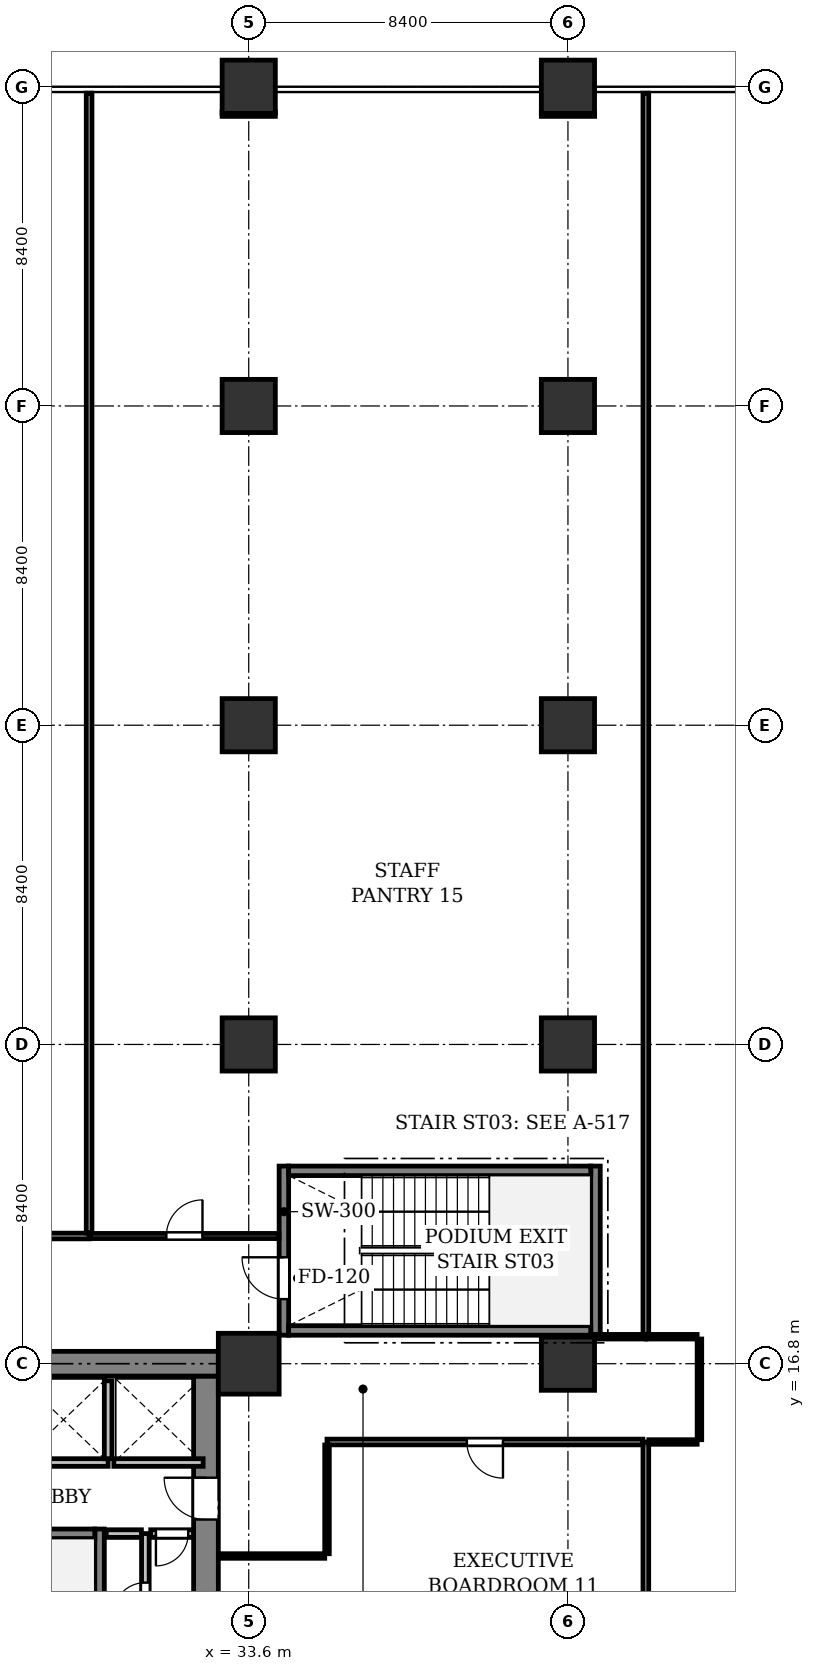
"""IFC4 building model, lengths in metres.
Left out: names, types, materials, properties, quantities, classifications, styles, units other than length and angle.
Written with IfcOpenShell. Run it as: python <this file> out.ifc"""

import sys

from ifc_helpers import new_model, si_unit, direction, frame, frame_2d, origin, origin_2d, place, context, subcontext, project, spatial, rectangle, extrude, element, fill, save


model = new_model("IFC4")
c1 = context("Model", 3, precision=1e-05, world=origin(), true_north=direction((0.0, 1.0)))
c2 = subcontext(c1, "Body", "Model", "MODEL_VIEW")
j1 = project(units=[si_unit("LENGTHUNIT", "METRE"), si_unit("PLANEANGLEUNIT", "RADIAN")], contexts=[c1])
p1 = place(None, origin())
s1 = spatial("IfcSite", under=j1, at=p1, CompositionType="ELEMENT")
p2 = place(p1, origin())
s2 = spatial("IfcBuilding", under=s1, at=p2, CompositionType="ELEMENT")
p3 = place(p2, frame((0.0, 0.0, 10.2)))
s3 = spatial("IfcBuildingStorey", under=s2, at=p3, CompositionType="ELEMENT", Elevation=10.2)
p4 = place(p3, frame((33.6, 16.8, 0.0), z_axis=(0.0, 0.0, 1.0), x_axis=(1.0, 0.0, 0.0)))
e1 = element("IfcColumn", 1, at=p4, inside=s3, PredefinedType="COLUMN", context=c2, shape_type="SweptSolid", body=[
    extrude(rectangle(XDim=1.6, YDim=1.6, at=origin_2d()), origin(), (0.0, 0.0, 1.0), 4.8),
])
for number, where, z_axis, x_axis in (
    (2, (33.6, 25.2, 0.0), (0.0, 0.0, 1.0), (1.0, 0.0, 0.0)),
    (3, (33.6, 33.6, 0.0), (0.0, 0.0, 1.0), (1.0, 0.0, 0.0)),
    (4, (33.6, 42.0, 0.0), (0.0, 0.0, 1.0), (1.0, 0.0, 0.0)),
    (5, (33.6, 50.4, 0.0), (0.0, 0.0, 1.0), (1.0, 0.0, 0.0)),
    (6, (42.0, 16.8, 0.0), (0.0, 0.0, 1.0), (1.0, 0.0, 0.0)),
    (7, (42.0, 25.2, 0.0), (0.0, 0.0, 1.0), (1.0, 0.0, 0.0)),
    (8, (42.0, 33.6, 0.0), (0.0, 0.0, 1.0), (1.0, 0.0, 0.0)),
    (9, (42.0, 42.0, 0.0), (0.0, 0.0, 1.0), (1.0, 0.0, 0.0)),
    (10, (42.0, 50.4, 0.0), (0.0, 0.0, 1.0), (1.0, 0.0, 0.0)),
):
    element("IfcColumn", number, at=place(p3, frame(where, z_axis=z_axis, x_axis=x_axis)), inside=s3, PredefinedType="COLUMN", context=c2, shape_type="SweptSolid", body=[
        extrude(rectangle(XDim=1.4, YDim=1.4, at=origin_2d()), origin(), (0.0, 0.0, 1.0), 4.8),
    ])
p5 = place(p3, frame((32.475, 8.725, 0.0), z_axis=(0.0, 0.0, 1.0), x_axis=(0.0, 1.0, 0.0)))
e11 = element("IfcWall", 11, at=p5, inside=s3, PredefinedType="SHEAR", context=c2, shape_type="SweptSolid", body=[
    extrude(rectangle(XDim=7.75, YDim=0.65, at=frame_2d((3.875, 0.0))), origin(), (0.0, 0.0, 1.0), 4.525),
])
p6 = place(p5, frame((3.975, 0.0, 0.0)))
e12 = element("IfcOpeningElement", 12, at=p6, cuts=e11, PredefinedType="OPENING", context=c2, shape_type="SweptSolid", body=[
    extrude(rectangle(XDim=1.1, YDim=2.15, at=frame_2d((0.55, 1.075))), frame((0.0, 0.335, 0.0), z_axis=(0.0, -1.0, 0.0), x_axis=(1.0, 0.0, 0.0)), (0.0, 0.0, 1.0), 0.67),
])
p7 = place(p3, frame((26.0, 16.8, 0.0), z_axis=(0.0, 0.0, 1.0), x_axis=(1.0, 0.0, 0.0)))
e13 = element("IfcWall", 13, at=p7, inside=s3, PredefinedType="SHEAR", context=c2, shape_type="SweptSolid", body=[
    extrude(rectangle(XDim=6.8, YDim=0.65, at=frame_2d((3.4, 0.0))), origin(), (0.0, 0.0, 1.0), 4.525),
])
p8 = place(p3, frame((29.675, 8.7, 0.0), z_axis=(0.0, 0.0, 1.0), x_axis=(0.0, 1.0, 0.0)))
e14 = element("IfcWall", 14, at=p8, inside=s3, PredefinedType="SHEAR", context=c2, shape_type="SweptSolid", body=[
    extrude(rectangle(XDim=3.75, YDim=0.25, at=frame_2d((1.875, 0.0))), origin(), (0.0, 0.0, 1.0), 4.525),
])
p9 = place(p3, frame((21.8, 12.325, 0.0), z_axis=(0.0, 0.0, 1.0), x_axis=(1.0, 0.0, 0.0)))
e15 = element("IfcWall", 15, at=p9, inside=s3, PredefinedType="SHEAR", context=c2, shape_type="SweptSolid", body=[
    extrude(rectangle(XDim=7.75, YDim=0.25, at=frame_2d((3.875, 0.0))), origin(), (0.0, 0.0, 1.0), 4.525),
])
p10 = place(p9, frame((0.22, 0.0, 0.0)))
e16 = element("IfcOpeningElement", 16, at=p10, cuts=e15, PredefinedType="OPENING", context=c2, shape_type="SweptSolid", body=[
    extrude(rectangle(XDim=1.1, YDim=2.15, at=frame_2d((0.55, 1.075))), frame((0.0, 0.135, 0.0), z_axis=(0.0, -1.0, 0.0), x_axis=(1.0, 0.0, 0.0)), (0.0, 0.0, 1.0), 0.27),
])
p11 = place(p3, frame((34.525, 17.55, 0.0), z_axis=(0.0, 0.0, 1.0), x_axis=(0.0, 1.0, 0.0)))
e17 = element("IfcWall", 17, at=p11, inside=s3, PredefinedType="SHEAR", context=c2, shape_type="SweptSolid", body=[
    extrude(rectangle(XDim=4.45, YDim=0.25, at=frame_2d((2.225, 0.0))), origin(), (0.0, 0.0, 1.0), 4.525),
])
p12 = place(p11, frame((0.95, 0.0, 0.0)))
e18 = element("IfcOpeningElement", 18, at=p12, cuts=e17, PredefinedType="OPENING", context=c2, shape_type="SweptSolid", body=[
    extrude(rectangle(XDim=1.1, YDim=2.15, at=frame_2d((0.55, 1.075))), frame((0.0, 0.135, 0.0), z_axis=(0.0, -1.0, 0.0), x_axis=(1.0, 0.0, 0.0)), (0.0, 0.0, 1.0), 0.27),
])
p13 = place(p3, frame((42.725, 17.55, 0.0), z_axis=(0.0, 0.0, 1.0), x_axis=(0.0, 1.0, 0.0)))
e19 = element("IfcWall", 19, at=p13, inside=s3, PredefinedType="SHEAR", context=c2, shape_type="SweptSolid", body=[
    extrude(rectangle(XDim=4.45, YDim=0.25, at=frame_2d((2.225, 0.0))), origin(), (0.0, 0.0, 1.0), 4.525),
])
for number, where, z_axis, x_axis in (
    (20, (34.65, 17.675, 0.0), (0.0, 0.0, 1.0), (1.0, 0.0, 0.0)),
    (21, (34.65, 21.875, 0.0), (0.0, 0.0, 1.0), (1.0, 0.0, 0.0)),
):
    element("IfcWall", number, at=place(p3, frame(where, z_axis=z_axis, x_axis=x_axis)), inside=s3, PredefinedType="SHEAR", context=c2, shape_type="SweptSolid", body=[
        extrude(rectangle(XDim=7.95, YDim=0.25, at=frame_2d((3.975, 0.0))), origin(), (0.0, 0.0, 1.0), 4.525),
    ])
p14 = place(p3, frame((27.55, 14.2, 0.0), z_axis=(0.0, 0.0, 1.0), x_axis=(1.0, 0.0, 0.0)))
e22 = element("IfcWall", 22, at=p14, inside=s3, PredefinedType="PARTITIONING", context=c2, shape_type="SweptSolid", body=[
    extrude(rectangle(XDim=2.35, YDim=0.2, at=frame_2d((1.175, 0.0))), origin(), (0.0, 0.0, 1.0), 4.525),
])
p15 = place(p3, frame((29.9, 14.3, 0.0), z_axis=(0.0, 0.0, 1.0), x_axis=(0.0, 1.0, 0.0)))
e23 = element("IfcWall", 23, at=p15, inside=s3, PredefinedType="PARTITIONING", context=c2, shape_type="SweptSolid", body=[
    extrude(rectangle(XDim=2.05, YDim=0.2, at=frame_2d((1.025, 0.0))), origin(), (0.0, 0.0, 1.0), 4.525),
])
p16 = place(p3, frame((30.05, 14.2, 0.0), z_axis=(0.0, 0.0, 1.0), x_axis=(1.0, 0.0, 0.0)))
e24 = element("IfcWall", 24, at=p16, inside=s3, PredefinedType="PARTITIONING", context=c2, shape_type="SweptSolid", body=[
    extrude(rectangle(XDim=2.35, YDim=0.2, at=frame_2d((1.175, 0.0))), origin(), (0.0, 0.0, 1.0), 4.525),
])
p17 = place(p3, frame((30.88, 8.9, 0.0), z_axis=(0.0, 0.0, 1.0), x_axis=(0.0, 1.0, 0.0)))
e25 = element("IfcWall", 25, at=p17, inside=s3, PredefinedType="PARTITIONING", context=c2, shape_type="SweptSolid", body=[
    extrude(rectangle(XDim=3.43, YDim=0.2, at=frame_2d((1.715, 0.0))), origin(), (0.0, 0.0, 1.0), 4.525),
])
p18 = place(p17, frame((1.29, 0.0, 0.0)))
e26 = element("IfcOpeningElement", 26, at=p18, cuts=e25, PredefinedType="OPENING", context=c2, shape_type="SweptSolid", body=[
    extrude(rectangle(XDim=0.85, YDim=2.15, at=frame_2d((0.425, 1.075))), frame((0.0, 0.11, 0.0), z_axis=(0.0, -1.0, 0.0), x_axis=(1.0, 0.0, 0.0)), (0.0, 0.0, 1.0), 0.22),
])
p19 = place(p3, frame((30.776, 12.33, 0.0), z_axis=(0.0, 0.0, 1.0), x_axis=(-1.0, 0.0, 0.0)))
e27 = element("IfcWall", 27, at=p19, inside=s3, PredefinedType="PARTITIONING", context=c2, shape_type="SweptSolid", body=[
    extrude(rectangle(XDim=0.926, YDim=0.2, at=frame_2d((0.463, 0.0))), origin(), (0.0, 0.0, 1.0), 4.525),
])
p20 = place(p3, frame((32.146, 12.33, 0.0), z_axis=(0.0, 0.0, 1.0), x_axis=(-1.0, 0.0, 0.0)))
e28 = element("IfcWall", 28, at=p20, inside=s3, PredefinedType="PARTITIONING", context=c2, shape_type="SweptSolid", body=[
    extrude(rectangle(XDim=1.126, YDim=0.2, at=frame_2d((0.563, 0.0))), origin(), (0.0, 0.0, 1.0), 4.525),
])
p21 = place(p20, frame((0.138, 0.0, 0.0)))
e29 = element("IfcOpeningElement", 29, at=p21, cuts=e28, PredefinedType="OPENING", context=c2, shape_type="SweptSolid", body=[
    extrude(rectangle(XDim=0.85, YDim=2.15, at=frame_2d((0.425, 1.075))), frame((0.0, 0.11, 0.0), z_axis=(0.0, -1.0, 0.0), x_axis=(1.0, 0.0, 0.0)), (0.0, 0.0, 1.0), 0.22),
])
p22 = place(p3, frame((44.05, 7.824, 0.0), z_axis=(0.0, 0.0, 1.0), x_axis=(0.0, 1.0, 0.0)))
e30 = element("IfcWall", 30, at=p22, inside=s3, PredefinedType="PARTITIONING", context=c2, shape_type="SweptSolid", body=[
    extrude(rectangle(XDim=6.916, YDim=0.15, at=frame_2d((3.458, 0.0))), origin(), (0.0, 0.0, 1.0), 3.725),
])
p23 = place(p3, frame((43.971, 14.74, 0.0), z_axis=(0.0, 0.0, 1.0), x_axis=(-1.0, 0.0, 0.0)))
e31 = element("IfcWall", 31, at=p23, inside=s3, PredefinedType="PARTITIONING", context=c2, shape_type="SweptSolid", body=[
    extrude(rectangle(XDim=8.311, YDim=0.15, at=frame_2d((4.156, 0.0))), origin(), (0.0, 0.0, 1.0), 3.913),
])
p24 = place(p23, frame((3.68, 0.0, 0.0)))
e32 = element("IfcOpeningElement", 32, at=p24, cuts=e31, PredefinedType="OPENING", context=c2, shape_type="SweptSolid", body=[
    extrude(rectangle(XDim=0.95, YDim=2.15, at=frame_2d((0.475, 1.075))), frame((0.0, 0.085, 0.0), z_axis=(0.0, -1.0, 0.0), x_axis=(1.0, 0.0, 0.0)), (0.0, 0.0, 1.0), 0.17),
])
p25 = place(p3, frame((35.66, 14.661, 0.0), z_axis=(0.0, 0.0, 1.0), x_axis=(0.0, -1.0, 0.0)))
e33 = element("IfcWall", 33, at=p25, inside=s3, PredefinedType="PARTITIONING", context=c2, shape_type="SweptSolid", body=[
    extrude(rectangle(XDim=2.861, YDim=0.12, at=frame_2d((1.43, 0.0))), origin(), (0.0, 0.0, 1.0), 4.525),
])
p26 = place(p3, frame((35.6, 11.74, 0.0), z_axis=(0.0, 0.0, 1.0), x_axis=(-1.0, 0.0, 0.0)))
e34 = element("IfcWall", 34, at=p26, inside=s3, PredefinedType="PARTITIONING", context=c2, shape_type="SweptSolid", body=[
    extrude(rectangle(XDim=2.796, YDim=0.12, at=frame_2d((1.398, 0.0))), origin(), (0.0, 0.0, 1.0), 3.913),
])
p27 = place(p3, frame((20.039, 20.16, 0.0), z_axis=(0.0, 0.0, 1.0), x_axis=(1.0, 0.0, 0.0)))
e35 = element("IfcWall", 35, at=p27, inside=s3, PredefinedType="PARTITIONING", context=c2, shape_type="SweptSolid", body=[
    extrude(rectangle(XDim=9.361, YDim=0.15, at=frame_2d((4.68, 0.0))), origin(), (0.0, 0.0, 1.0), 3.913),
])
p28 = place(p3, frame((29.4, 20.239, 0.0), z_axis=(0.0, 0.0, 1.0), x_axis=(0.0, 1.0, 0.0)))
e36 = element("IfcWall", 36, at=p28, inside=s3, PredefinedType="PARTITIONING", context=c2, shape_type="SweptSolid", body=[
    extrude(rectangle(XDim=29.992, YDim=0.15, at=frame_2d((14.996, 0.0))), origin(), (0.0, 0.0, 1.0), 3.725),
])
p29 = place(p3, frame((42.717, 17.51, 0.0), z_axis=(0.0, 0.0, 1.0), x_axis=(1.0, 0.0, 0.0)))
e37 = element("IfcWall", 37, at=p29, inside=s3, PredefinedType="PARTITIONING", context=c2, shape_type="SweptSolid", body=[
    extrude(rectangle(XDim=1.333, YDim=0.12, at=frame_2d((0.667, 0.0))), origin(), (0.0, 0.0, 1.0), 4.525),
])
p30 = place(p3, frame((44.05, 17.574, 0.0), z_axis=(0.0, 0.0, 1.0), x_axis=(0.0, 1.0, 0.0)))
e38 = element("IfcWall", 38, at=p30, inside=s3, PredefinedType="PARTITIONING", context=c2, shape_type="SweptSolid", body=[
    extrude(rectangle(XDim=32.657, YDim=0.15, at=frame_2d((16.329, 0.0))), origin(), (0.0, 0.0, 1.0), 3.725),
])
p31 = place(p3, frame((42.702, 49.68, 0.0), z_axis=(0.0, 0.0, 1.0), x_axis=(-0.999999984835, -0.000174155344, 0.0)))
e39 = element("IfcWall", 39, at=p31, inside=s3, PredefinedType="PARTITIONING", context=c2, shape_type="SweptSolid", body=[
    extrude(rectangle(XDim=1.402, YDim=0.12, at=frame_2d((0.701, 0.0))), origin(), (0.0, 0.0, 1.0), 3.913),
])
p32 = place(p3, frame((34.3, 49.68, 0.0), z_axis=(0.0, 0.0, 1.0), x_axis=(-1.0, 0.0, 0.0)))
e40 = element("IfcWall", 40, at=p32, inside=s3, PredefinedType="PARTITIONING", context=c2, shape_type="SweptSolid", body=[
    extrude(rectangle(XDim=1.4, YDim=0.12, at=frame_2d((0.7, 0.0))), origin(), (0.0, 0.0, 1.0), 3.913),
])
p33 = place(p3, frame((29.42, 20.16, 0.0), z_axis=(0.0, 0.0, 1.0), x_axis=(1.0, 0.0, 0.0)))
e41 = element("IfcWall", 41, at=p33, inside=s3, PredefinedType="PARTITIONING", context=c2, shape_type="SweptSolid", body=[
    extrude(rectangle(XDim=4.976, YDim=0.135, at=frame_2d((2.488, 0.0))), origin(), (0.0, 0.0, 1.0), 3.913),
])
p34 = place(p33, frame((2.013, 0.0, 0.0)))
e42 = element("IfcOpeningElement", 42, at=p34, cuts=e41, PredefinedType="OPENING", context=c2, shape_type="SweptSolid", body=[
    extrude(rectangle(XDim=0.95, YDim=2.15, at=frame_2d((0.475, 1.075))), frame((0.0, 0.077, 0.0), z_axis=(0.0, -1.0, 0.0), x_axis=(1.0, 0.0, 0.0)), (0.0, 0.0, 1.0), 0.155),
])
p35 = place(p3, frame((44.07, 17.51, 0.0), z_axis=(0.0, 0.0, 1.0), x_axis=(1.0, 0.0, 0.0)))
e43 = element("IfcWall", 43, at=p35, inside=s3, PredefinedType="PARTITIONING", context=c2, shape_type="SweptSolid", body=[
    extrude(rectangle(XDim=1.33, YDim=0.12, at=frame_2d((0.665, 0.0))), origin(), (0.0, 0.0, 1.0), 4.525),
])
p36 = place(p3, frame((45.46, 17.45, 0.0), z_axis=(0.0, 0.0, 1.0), x_axis=(0.0, -1.0, 0.0)))
e44 = element("IfcWall", 44, at=p36, inside=s3, PredefinedType="PARTITIONING", context=c2, shape_type="SweptSolid", body=[
    extrude(rectangle(XDim=2.65, YDim=0.12, at=frame_2d((1.325, 0.0))), origin(), (0.0, 0.0, 1.0), 3.725),
])
p37 = place(p3, frame((45.4, 14.74, 0.0), z_axis=(0.0, 0.0, 1.0), x_axis=(-1.0, 0.0, 0.0)))
e45 = element("IfcWall", 45, at=p37, inside=s3, PredefinedType="PARTITIONING", context=c2, shape_type="SweptSolid", body=[
    extrude(rectangle(XDim=1.271, YDim=0.12, at=frame_2d((0.635, 0.0))), origin(), (0.0, 0.0, 1.0), 4.525),
])
p38 = place(p6, origin())
e46 = element("IfcDoor", 46, at=p38, inside=s3, OperationType="SINGLE_SWING_RIGHT", PredefinedType="DOOR", context=c2, shape_type="SweptSolid", body=[
    extrude(rectangle(XDim=1.1, YDim=2.15, at=frame_2d((0.55, 1.075))), frame((0.0, 0.025, 0.0), z_axis=(0.0, -1.0, 0.0), x_axis=(1.0, 0.0, 0.0)), (0.0, 0.0, 1.0), 0.05),
])
fill(e12, e46)
p39 = place(p12, origin())
e47 = element("IfcDoor", 47, at=p39, inside=s3, OperationType="SINGLE_SWING_RIGHT", PredefinedType="DOOR", context=c2, shape_type="SweptSolid", body=[
    extrude(rectangle(XDim=1.1, YDim=2.15, at=frame_2d((0.55, 1.075))), frame((0.0, 0.025, 0.0), z_axis=(0.0, -1.0, 0.0), x_axis=(1.0, 0.0, 0.0)), (0.0, 0.0, 1.0), 0.05),
])
fill(e18, e47)
p40 = place(p18, origin())
e48 = element("IfcDoor", 48, at=p40, inside=s3, OperationType="SINGLE_SWING_LEFT", PredefinedType="DOOR", context=c2, shape_type="SweptSolid", body=[
    extrude(rectangle(XDim=0.85, YDim=2.15, at=frame_2d((0.425, 1.075))), frame((0.0, 0.025, 0.0), z_axis=(0.0, -1.0, 0.0), x_axis=(1.0, 0.0, 0.0)), (0.0, 0.0, 1.0), 0.05),
])
fill(e26, e48)
p41 = place(p21, origin())
e49 = element("IfcDoor", 49, at=p41, inside=s3, OperationType="SINGLE_SWING_RIGHT", PredefinedType="DOOR", context=c2, shape_type="SweptSolid", body=[
    extrude(rectangle(XDim=0.85, YDim=2.15, at=frame_2d((0.425, 1.075))), frame((0.0, 0.025, 0.0), z_axis=(0.0, -1.0, 0.0), x_axis=(1.0, 0.0, 0.0)), (0.0, 0.0, 1.0), 0.05),
])
fill(e29, e49)
p42 = place(p24, origin())
e50 = element("IfcDoor", 50, at=p42, inside=s3, OperationType="SINGLE_SWING_LEFT", PredefinedType="DOOR", context=c2, shape_type="SweptSolid", body=[
    extrude(rectangle(XDim=0.95, YDim=2.15, at=frame_2d((0.475, 1.075))), frame((0.0, 0.025, 0.0), z_axis=(0.0, -1.0, 0.0), x_axis=(1.0, 0.0, 0.0)), (0.0, 0.0, 1.0), 0.05),
])
fill(e32, e50)
p43 = place(p34, origin())
e51 = element("IfcDoor", 51, at=p43, inside=s3, OperationType="SINGLE_SWING_RIGHT", PredefinedType="DOOR", context=c2, shape_type="SweptSolid", body=[
    extrude(rectangle(XDim=0.95, YDim=2.15, at=frame_2d((0.475, 1.075))), frame((0.0, 0.025, 0.0), z_axis=(0.0, -1.0, 0.0), x_axis=(1.0, 0.0, 0.0)), (0.0, 0.0, 1.0), 0.05),
])
fill(e42, e51)
save(model, sys.argv[1])
